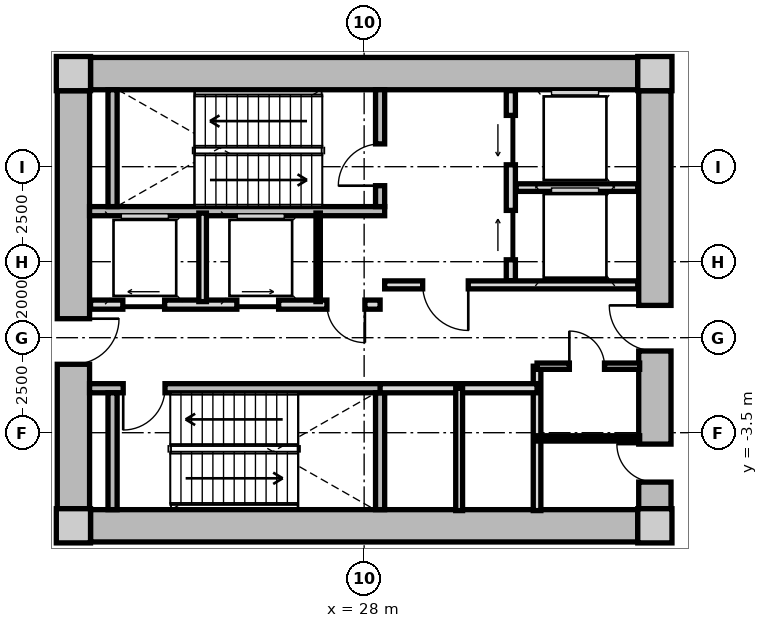
"""IFC4 building model, lengths in metres.
Left out: names, types, materials, properties, quantities, classifications, styles, units other than length and angle.
Written with IfcOpenShell. Run it as: python <this file> out.ifc"""

import sys

from ifc_helpers import new_model, si_unit, direction, frame, frame_2d, origin, origin_2d, place, context, subcontext, project, spatial, rectangle, extrude, source, transform, mapped, element, fill, save


model = new_model("IFC4")
c1 = context("Model", 3, precision=1e-05, world=origin(), true_north=direction((0.0, 1.0)))
c2 = subcontext(c1, "Body", "Model", "MODEL_VIEW")
j1 = project(units=[si_unit("LENGTHUNIT", "METRE"), si_unit("PLANEANGLEUNIT", "RADIAN")], contexts=[c1])
p1 = place(None, origin())
s1 = spatial("IfcSite", under=j1, at=p1, CompositionType="ELEMENT")
p2 = place(p1, origin())
s2 = spatial("IfcBuilding", under=s1, at=p2, CompositionType="ELEMENT")
p3 = place(p2, frame((0.0, 0.0, 16.8)))
s3 = spatial("IfcBuildingStorey", under=s2, at=p3, CompositionType="ELEMENT", Elevation=16.8)
m1 = source(origin(), c2, "Body", "SweptSolid", [
    extrude(rectangle(XDim=0.9, YDim=0.9, at=origin_2d()), origin(), (0.0, 0.0, 1.0), 4.8),
])
for number, where, z_axis, x_axis in (
    (1, (20.35, -5.95, 0.0), (0.0, 0.0, 1.0), (1.0, 0.0, 0.0)),
    (2, (35.65, -5.95, 0.0), (0.0, 0.0, 1.0), (1.0, 0.0, 0.0)),
    (3, (35.65, 5.95, 0.0), (0.0, 0.0, 1.0), (1.0, 0.0, 0.0)),
    (4, (20.35, 5.95, 0.0), (0.0, 0.0, 1.0), (1.0, 0.0, 0.0)),
):
    element("IfcColumn", number, at=place(p3, frame(where, z_axis=z_axis, x_axis=x_axis)), inside=s3, PredefinedType="COLUMN", context=c2, shape_type="MappedRepresentation", body=[
        mapped(m1, transform((0.0, 0.0, 0.0), x_axis=(1.0, 0.0, 0.0), y_axis=(0.0, 1.0, 0.0), z_axis=(0.0, 0.0, 1.0), scale=1.0)),
    ])
m2 = source(origin(), c2, "Body", "SweptSolid", [
    extrude(rectangle(XDim=14.4, YDim=0.85, at=frame_2d((7.2, 0.0))), origin(), (0.0, 0.0, 1.0), 4.38),
])
for number, where, z_axis, x_axis in (
    (5, (20.8, 5.95, 0.0), (0.0, 0.0, 1.0), (1.0, 0.0, 0.0)),
    (6, (35.2, -5.95, 0.0), (0.0, 0.0, 1.0), (-1.0, 0.0, 0.0)),
):
    element("IfcWall", number, at=place(p3, frame(where, z_axis=z_axis, x_axis=x_axis)), inside=s3, PredefinedType="SHEAR", context=c2, shape_type="MappedRepresentation", body=[
        mapped(m2, transform((0.0, 0.0, 0.0), x_axis=(1.0, 0.0, 0.0), y_axis=(0.0, 1.0, 0.0), z_axis=(0.0, 0.0, 1.0), scale=1.0)),
    ])
m3 = source(origin(), c2, "Body", "SweptSolid", [
    extrude(rectangle(XDim=11.0, YDim=0.85, at=frame_2d((5.5, 0.0))), origin(), (0.0, 0.0, 1.0), 4.38),
])
p4 = place(p3, frame((20.35, -5.5, 0.0), z_axis=(0.0, 0.0, 1.0), x_axis=(0.0, 1.0, 0.0)))
e7 = element("IfcWall", 7, at=p4, inside=s3, PredefinedType="SHEAR", context=c2, shape_type="MappedRepresentation", body=[
    mapped(m3, transform((0.0, 0.0, 0.0), x_axis=(1.0, 0.0, 0.0), y_axis=(0.0, 1.0, 0.0), z_axis=(0.0, 0.0, 1.0), scale=1.0)),
])
p5 = place(p4, frame((3.8, 0.0, 0.0)))
e8 = element("IfcOpeningElement", 8, at=p5, cuts=e7, PredefinedType="OPENING", context=c2, shape_type="SweptSolid", body=[
    extrude(rectangle(XDim=1.2, YDim=2.15, at=frame_2d((0.6, 1.075))), frame((0.0, 0.435, 0.0), z_axis=(0.0, -1.0, 0.0), x_axis=(1.0, 0.0, 0.0)), (0.0, 0.0, 1.0), 0.87),
])
p6 = place(p3, frame((35.65, 5.5, 0.0), z_axis=(0.0, 0.0, 1.0), x_axis=(0.0, -1.0, 0.0)))
e9 = element("IfcWall", 9, at=p6, inside=s3, PredefinedType="SHEAR", context=c2, shape_type="MappedRepresentation", body=[
    mapped(m3, transform((0.0, 0.0, 0.0), x_axis=(1.0, 0.0, 0.0), y_axis=(0.0, 1.0, 0.0), z_axis=(0.0, 0.0, 1.0), scale=1.0)),
])
p7 = place(p6, frame((5.65, 0.0, 0.0)))
e10 = element("IfcOpeningElement", 10, at=p7, cuts=e9, PredefinedType="OPENING", context=c2, shape_type="SweptSolid", body=[
    extrude(rectangle(XDim=1.2, YDim=2.15, at=frame_2d((0.6, 1.075))), frame((0.0, 0.435, 0.0), z_axis=(0.0, -1.0, 0.0), x_axis=(1.0, 0.0, 0.0)), (0.0, 0.0, 1.0), 0.87),
])
p8 = place(p6, frame((9.3, 0.0, 0.0)))
e11 = element("IfcOpeningElement", 11, at=p8, cuts=e9, PredefinedType="OPENING", context=c2, shape_type="SweptSolid", body=[
    extrude(rectangle(XDim=1.0, YDim=2.1, at=frame_2d((0.5, 1.05))), frame((0.0, 0.435, 0.0), z_axis=(0.0, -1.0, 0.0), x_axis=(1.0, 0.0, 0.0)), (0.0, 0.0, 1.0), 0.87),
])
m4 = source(origin(), c2, "Body", "SweptSolid", [
    extrude(rectangle(XDim=7.765, YDim=0.24, at=frame_2d((3.883, 0.0))), origin(), (0.0, 0.0, 1.0), 4.38),
])
p9 = place(p3, frame((20.775, 2.33, 0.0), z_axis=(0.0, 0.0, 1.0), x_axis=(1.0, 0.0, 0.0)))
e12 = element("IfcWall", 12, at=p9, inside=s3, PredefinedType="PARTITIONING", context=c2, shape_type="MappedRepresentation", body=[
    mapped(m4, transform((0.0, 0.0, 0.0), x_axis=(1.0, 0.0, 0.0), y_axis=(0.0, 1.0, 0.0), z_axis=(0.0, 0.0, 1.0), scale=1.0)),
])
m5 = source(origin(), c2, "Body", "SweptSolid", [
    extrude(rectangle(XDim=3.075, YDim=0.24, at=frame_2d((1.538, 0.0))), origin(), (0.0, 0.0, 1.0), 4.38),
])
p10 = place(p3, frame((21.38, 2.45, 0.0), z_axis=(0.0, 0.0, 1.0), x_axis=(0.0, 1.0, 0.0)))
e13 = element("IfcWall", 13, at=p10, inside=s3, PredefinedType="PARTITIONING", context=c2, shape_type="MappedRepresentation", body=[
    mapped(m5, transform((0.0, 0.0, 0.0), x_axis=(1.0, 0.0, 0.0), y_axis=(0.0, 1.0, 0.0), z_axis=(0.0, 0.0, 1.0), scale=1.0)),
])
p11 = place(p3, frame((28.42, 2.45, 0.0), z_axis=(0.0, 0.0, 1.0), x_axis=(0.0, 1.0, 0.0)))
e14 = element("IfcWall", 14, at=p11, inside=s3, PredefinedType="PARTITIONING", context=c2, shape_type="MappedRepresentation", body=[
    mapped(m5, transform((0.0, 0.0, 0.0), x_axis=(1.0, 0.0, 0.0), y_axis=(0.0, 1.0, 0.0), z_axis=(0.0, 0.0, 1.0), scale=1.0)),
])
p12 = place(p11, frame((0.55, 0.0, 0.0)))
e15 = element("IfcOpeningElement", 15, at=p12, cuts=e14, PredefinedType="OPENING", context=c2, shape_type="SweptSolid", body=[
    extrude(rectangle(XDim=1.1, YDim=2.15, at=frame_2d((0.55, 1.075))), frame((0.0, 0.13, 0.0), z_axis=(0.0, -1.0, 0.0), x_axis=(1.0, 0.0, 0.0)), (0.0, 0.0, 1.0), 0.26),
])
p13 = place(p3, frame((20.775, -2.33, 0.0), z_axis=(0.0, 0.0, 1.0), x_axis=(1.0, 0.0, 0.0)))
e16 = element("IfcWall", 16, at=p13, inside=s3, PredefinedType="PARTITIONING", context=c2, shape_type="MappedRepresentation", body=[
    mapped(m4, transform((0.0, 0.0, 0.0), x_axis=(1.0, 0.0, 0.0), y_axis=(0.0, 1.0, 0.0), z_axis=(0.0, 0.0, 1.0), scale=1.0)),
])
p14 = place(p13, frame((0.885, 0.0, 0.0)))
e17 = element("IfcOpeningElement", 17, at=p14, cuts=e16, PredefinedType="OPENING", context=c2, shape_type="SweptSolid", body=[
    extrude(rectangle(XDim=1.1, YDim=2.15, at=frame_2d((0.55, 1.075))), frame((0.0, 0.13, 0.0), z_axis=(0.0, -1.0, 0.0), x_axis=(1.0, 0.0, 0.0)), (0.0, 0.0, 1.0), 0.26),
])
for number, where, z_axis, x_axis in (
    (18, (21.38, -5.525, 0.0), (0.0, 0.0, 1.0), (0.0, 1.0, 0.0)),
    (19, (28.42, -5.525, 0.0), (0.0, 0.0, 1.0), (0.0, 1.0, 0.0)),
):
    element("IfcWall", number, at=place(p3, frame(where, z_axis=z_axis, x_axis=x_axis)), inside=s3, PredefinedType="PARTITIONING", context=c2, shape_type="MappedRepresentation", body=[
        mapped(m5, transform((0.0, 0.0, 0.0), x_axis=(1.0, 0.0, 0.0), y_axis=(0.0, 1.0, 0.0), z_axis=(0.0, 0.0, 1.0), scale=1.0)),
    ])
m6 = source(origin(), c2, "Body", "SweptSolid", [
    extrude(rectangle(XDim=5.0, YDim=0.24, at=frame_2d((2.5, 0.0))), origin(), (0.0, 0.0, 1.0), 4.365),
])
p15 = place(p3, frame((31.86, 0.5, 0.0), z_axis=(0.0, 0.0, 1.0), x_axis=(0.0, 1.0, 0.0)))
e20 = element("IfcWall", 20, at=p15, inside=s3, PredefinedType="PARTITIONING", context=c2, shape_type="MappedRepresentation", body=[
    mapped(m6, transform((0.0, 0.0, 0.0), x_axis=(1.0, 0.0, 0.0), y_axis=(0.0, 1.0, 0.0), z_axis=(0.0, 0.0, 1.0), scale=1.0)),
])
p16 = place(p15, frame((3.05, 0.0, 0.0)))
e21 = element("IfcOpeningElement", 21, at=p16, cuts=e20, PredefinedType="OPENING", context=c2, shape_type="SweptSolid", body=[
    extrude(rectangle(XDim=1.3, YDim=2.2, at=frame_2d((0.65, 1.1))), frame((0.0, 0.13, 0.0), z_axis=(0.0, -1.0, 0.0), x_axis=(1.0, 0.0, 0.0)), (0.0, 0.0, 1.0), 0.26),
])
p17 = place(p15, frame((0.55, 0.0, 0.0)))
e22 = element("IfcOpeningElement", 22, at=p17, cuts=e20, PredefinedType="OPENING", context=c2, shape_type="SweptSolid", body=[
    extrude(rectangle(XDim=1.3, YDim=2.2, at=frame_2d((0.65, 1.1))), frame((0.0, 0.13, 0.0), z_axis=(0.0, -1.0, 0.0), x_axis=(1.0, 0.0, 0.0)), (0.0, 0.0, 1.0), 0.26),
])
m7 = source(origin(), c2, "Body", "SweptSolid", [
    extrude(rectangle(XDim=3.2, YDim=0.2, at=frame_2d((1.6, 0.0))), origin(), (0.0, 0.0, 1.0), 4.365),
])
p18 = place(p3, frame((32.0, 2.95, 0.0), z_axis=(0.0, 0.0, 1.0), x_axis=(1.0, 0.0, 0.0)))
e23 = element("IfcWall", 23, at=p18, inside=s3, PredefinedType="PARTITIONING", context=c2, shape_type="MappedRepresentation", body=[
    mapped(m7, transform((0.0, 0.0, 0.0), x_axis=(1.0, 0.0, 0.0), y_axis=(0.0, 1.0, 0.0), z_axis=(0.0, 0.0, 1.0), scale=1.0)),
])
m8 = source(origin(), c2, "Body", "SweptSolid", [
    extrude(rectangle(XDim=6.66, YDim=0.21, at=frame_2d((3.33, 0.0))), origin(), (0.0, 0.0, 1.0), 4.365),
])
p19 = place(p3, frame((28.54, 0.39, 0.0), z_axis=(0.0, 0.0, 1.0), x_axis=(1.0, 0.0, 0.0)))
e24 = element("IfcWall", 24, at=p19, inside=s3, PredefinedType="PARTITIONING", context=c2, shape_type="MappedRepresentation", body=[
    mapped(m8, transform((0.0, 0.0, 0.0), x_axis=(1.0, 0.0, 0.0), y_axis=(0.0, 1.0, 0.0), z_axis=(0.0, 0.0, 1.0), scale=1.0)),
])
p20 = place(p19, frame((1.0, 0.0, 0.0)))
e25 = element("IfcOpeningElement", 25, at=p20, cuts=e24, PredefinedType="OPENING", context=c2, shape_type="SweptSolid", body=[
    extrude(rectangle(XDim=1.2, YDim=2.15, at=frame_2d((0.6, 1.075))), frame((0.0, 0.115, 0.0), z_axis=(0.0, -1.0, 0.0), x_axis=(1.0, 0.0, 0.0)), (0.0, 0.0, 1.0), 0.23),
])
m9 = source(origin(), c2, "Body", "SweptSolid", [
    extrude(rectangle(XDim=7.62, YDim=0.24, at=frame_2d((3.81, 0.0))), origin(), (0.0, 0.0, 1.0), 4.365),
])
p21 = place(p3, frame((20.8, -0.13, 0.0), z_axis=(0.0, 0.0, 1.0), x_axis=(1.0, 0.0, 0.0)))
e26 = element("IfcWall", 26, at=p21, inside=s3, PredefinedType="PARTITIONING", context=c2, shape_type="MappedRepresentation", body=[
    mapped(m9, transform((0.0, 0.0, 0.0), x_axis=(1.0, 0.0, 0.0), y_axis=(0.0, 1.0, 0.0), z_axis=(0.0, 0.0, 1.0), scale=1.0)),
])
p22 = place(p21, frame((6.22, 0.0, 0.0)))
e27 = element("IfcOpeningElement", 27, at=p22, cuts=e26, PredefinedType="OPENING", context=c2, shape_type="SweptSolid", body=[
    extrude(rectangle(XDim=1.0, YDim=2.1, at=frame_2d((0.5, 1.05))), frame((0.0, 0.13, 0.0), z_axis=(0.0, -1.0, 0.0), x_axis=(1.0, 0.0, 0.0)), (0.0, 0.0, 1.0), 0.26),
])
p23 = place(p21, frame((0.85, 0.0, 0.0)))
e28 = element("IfcOpeningElement", 28, at=p23, cuts=e26, PredefinedType="OPENING", context=c2, shape_type="SweptSolid", body=[
    extrude(rectangle(XDim=1.1, YDim=2.2, at=frame_2d((0.55, 1.1))), frame((0.0, 0.13, 0.0), z_axis=(0.0, -1.0, 0.0), x_axis=(1.0, 0.0, 0.0)), (0.0, 0.0, 1.0), 0.26),
])
p24 = place(p21, frame((3.85, 0.0, 0.0)))
e29 = element("IfcOpeningElement", 29, at=p24, cuts=e26, PredefinedType="OPENING", context=c2, shape_type="SweptSolid", body=[
    extrude(rectangle(XDim=1.1, YDim=2.2, at=frame_2d((0.55, 1.1))), frame((0.0, 0.13, 0.0), z_axis=(0.0, -1.0, 0.0), x_axis=(1.0, 0.0, 0.0)), (0.0, 0.0, 1.0), 0.26),
])
m10 = source(origin(), c2, "Body", "SweptSolid", [
    extrude(rectangle(XDim=2.33, YDim=0.115, at=frame_2d((1.165, 0.0))), origin(), (0.0, 0.0, 1.0), 4.365),
])
p25 = place(p3, frame((26.79, -0.05, 0.0), z_axis=(0.0, 0.0, 1.0), x_axis=(0.0, 1.0, 0.0)))
e30 = element("IfcWall", 30, at=p25, inside=s3, PredefinedType="PARTITIONING", context=c2, shape_type="MappedRepresentation", body=[
    mapped(m10, transform((0.0, 0.0, 0.0), x_axis=(1.0, 0.0, 0.0), y_axis=(0.0, 1.0, 0.0), z_axis=(0.0, 0.0, 1.0), scale=1.0)),
])
m11 = source(origin(), c2, "Body", "SweptSolid", [
    extrude(rectangle(XDim=2.33, YDim=0.2, at=frame_2d((1.165, 0.0))), origin(), (0.0, 0.0, 1.0), 4.365),
])
p26 = place(p3, frame((23.75, -0.05, 0.0), z_axis=(0.0, 0.0, 1.0), x_axis=(0.0, 1.0, 0.0)))
e31 = element("IfcWall", 31, at=p26, inside=s3, PredefinedType="PARTITIONING", context=c2, shape_type="MappedRepresentation", body=[
    mapped(m11, transform((0.0, 0.0, 0.0), x_axis=(1.0, 0.0, 0.0), y_axis=(0.0, 1.0, 0.0), z_axis=(0.0, 0.0, 1.0), scale=1.0)),
])
m12 = source(origin(), c2, "Body", "SweptSolid", [
    extrude(rectangle(XDim=3.8, YDim=0.2, at=frame_2d((1.9, 0.0))), origin(), (0.0, 0.0, 1.0), 4.365),
])
p27 = place(p3, frame((32.55, -5.55, 0.0), z_axis=(0.0, 0.0, 1.0), x_axis=(0.0, 1.0, 0.0)))
e32 = element("IfcWall", 32, at=p27, inside=s3, PredefinedType="PARTITIONING", context=c2, shape_type="MappedRepresentation", body=[
    mapped(m12, transform((0.0, 0.0, 0.0), x_axis=(1.0, 0.0, 0.0), y_axis=(0.0, 1.0, 0.0), z_axis=(0.0, 0.0, 1.0), scale=1.0)),
])
m13 = source(origin(), c2, "Body", "SweptSolid", [
    extrude(rectangle(XDim=4.13, YDim=0.24, at=frame_2d((2.065, 0.0))), origin(), (0.0, 0.0, 1.0), 4.365),
])
p28 = place(p3, frame((28.42, -2.33, 0.0), z_axis=(0.0, 0.0, 1.0), x_axis=(1.0, 0.0, 0.0)))
e33 = element("IfcWall", 33, at=p28, inside=s3, PredefinedType="PARTITIONING", context=c2, shape_type="MappedRepresentation", body=[
    mapped(m13, transform((0.0, 0.0, 0.0), x_axis=(1.0, 0.0, 0.0), y_axis=(0.0, 1.0, 0.0), z_axis=(0.0, 0.0, 1.0), scale=1.0)),
])
m14 = source(origin(), c2, "Body", "SweptSolid", [
    extrude(rectangle(XDim=3.22, YDim=0.18, at=frame_2d((1.61, 0.0))), origin(), (0.0, 0.0, 1.0), 4.365),
])
p29 = place(p3, frame((30.5, -5.55, 0.0), z_axis=(0.0, 0.0, 1.0), x_axis=(0.0, 1.0, 0.0)))
e34 = element("IfcWall", 34, at=p29, inside=s3, PredefinedType="PARTITIONING", context=c2, shape_type="MappedRepresentation", body=[
    mapped(m14, transform((0.0, 0.0, 0.0), x_axis=(1.0, 0.0, 0.0), y_axis=(0.0, 1.0, 0.0), z_axis=(0.0, 0.0, 1.0), scale=1.0)),
])
m15 = source(origin(), c2, "Body", "SweptSolid", [
    extrude(rectangle(XDim=2.7, YDim=0.165, at=frame_2d((1.35, 0.0))), origin(), (0.0, 0.0, 1.0), 4.365),
])
p30 = place(p3, frame((32.55, -1.75, 0.0), z_axis=(0.0, 0.0, 1.0), x_axis=(1.0, 0.0, 0.0)))
e35 = element("IfcWall", 35, at=p30, inside=s3, PredefinedType="PARTITIONING", context=c2, shape_type="MappedRepresentation", body=[
    mapped(m15, transform((0.0, 0.0, 0.0), x_axis=(1.0, 0.0, 0.0), y_axis=(0.0, 1.0, 0.0), z_axis=(0.0, 0.0, 1.0), scale=1.0)),
])
p31 = place(p30, frame((0.85, 0.0, 0.0)))
e36 = element("IfcOpeningElement", 36, at=p31, cuts=e35, PredefinedType="OPENING", context=c2, shape_type="SweptSolid", body=[
    extrude(rectangle(XDim=0.925, YDim=2.1, at=frame_2d((0.462, 1.05))), frame((0.0, 0.093, 0.0), z_axis=(0.0, -1.0, 0.0), x_axis=(1.0, 0.0, 0.0)), (0.0, 0.0, 1.0), 0.185),
])
m16 = source(origin(), c2, "Body", "SweptSolid", [
    extrude(rectangle(XDim=2.7, YDim=0.14, at=frame_2d((1.35, 0.0))), origin(), (0.0, 0.0, 1.0), 4.365),
])
p32 = place(p3, frame((32.55, -3.65, 0.0), z_axis=(0.0, 0.0, 1.0), x_axis=(1.0, 0.0, 0.0)))
e37 = element("IfcWall", 37, at=p32, inside=s3, PredefinedType="PARTITIONING", context=c2, shape_type="MappedRepresentation", body=[
    mapped(m16, transform((0.0, 0.0, 0.0), x_axis=(1.0, 0.0, 0.0), y_axis=(0.0, 1.0, 0.0), z_axis=(0.0, 0.0, 1.0), scale=1.0)),
])
m17 = source(origin(), c2, "Body", "SweptSolid", [
    extrude(rectangle(XDim=1.1, YDim=2.15, at=frame_2d((0.55, 1.075))), frame((0.0, 0.025, 0.0), z_axis=(0.0, -1.0, 0.0), x_axis=(1.0, 0.0, 0.0)), (0.0, 0.0, 1.0), 0.05),
])
p33 = place(p12, origin())
e38 = element("IfcDoor", 38, at=p33, inside=s3, OperationType="SINGLE_SWING_LEFT", PredefinedType="DOOR", context=c2, shape_type="MappedRepresentation", body=[
    mapped(m17, transform((0.0, 0.0, 0.0), x_axis=(1.0, 0.0, 0.0), y_axis=(0.0, 1.0, 0.0), z_axis=(0.0, 0.0, 1.0), scale=1.0)),
])
fill(e15, e38)
p34 = place(p14, frame((1.1, 0.0, 0.0), z_axis=(0.0, 0.0, 1.0), x_axis=(-1.0, 0.0, 0.0)))
e39 = element("IfcDoor", 39, at=p34, inside=s3, OperationType="SINGLE_SWING_RIGHT", PredefinedType="DOOR", context=c2, shape_type="MappedRepresentation", body=[
    mapped(m17, transform((0.0, 0.0, 0.0), x_axis=(1.0, 0.0, 0.0), y_axis=(0.0, 1.0, 0.0), z_axis=(0.0, 0.0, 1.0), scale=1.0)),
])
fill(e17, e39)
m18 = source(origin(), c2, "Body", "SweptSolid", [
    extrude(rectangle(XDim=1.3, YDim=2.2, at=frame_2d((0.65, 1.1))), frame((0.0, 0.025, 0.0), z_axis=(0.0, -1.0, 0.0), x_axis=(1.0, 0.0, 0.0)), (0.0, 0.0, 1.0), 0.05),
])
p35 = place(p16, origin())
e40 = element("IfcDoor", 40, at=p35, inside=s3, OperationType="SLIDING_TO_LEFT", PredefinedType="DOOR", context=c2, shape_type="MappedRepresentation", body=[
    mapped(m18, transform((0.0, 0.0, 0.0), x_axis=(1.0, 0.0, 0.0), y_axis=(0.0, 1.0, 0.0), z_axis=(0.0, 0.0, 1.0), scale=1.0)),
])
fill(e21, e40)
p36 = place(p17, origin())
e41 = element("IfcDoor", 41, at=p36, inside=s3, OperationType="SLIDING_TO_RIGHT", PredefinedType="DOOR", context=c2, shape_type="MappedRepresentation", body=[
    mapped(m18, transform((0.0, 0.0, 0.0), x_axis=(1.0, 0.0, 0.0), y_axis=(0.0, 1.0, 0.0), z_axis=(0.0, 0.0, 1.0), scale=1.0)),
])
fill(e22, e41)
m19 = source(origin(), c2, "Body", "SweptSolid", [
    extrude(rectangle(XDim=1.2, YDim=2.15, at=frame_2d((0.6, 1.075))), frame((0.0, 0.025, 0.0), z_axis=(0.0, -1.0, 0.0), x_axis=(1.0, 0.0, 0.0)), (0.0, 0.0, 1.0), 0.05),
])
p37 = place(p20, frame((1.2, 0.0, 0.0), z_axis=(0.0, 0.0, 1.0), x_axis=(-1.0, 0.0, 0.0)))
e42 = element("IfcDoor", 42, at=p37, inside=s3, OperationType="SINGLE_SWING_LEFT", PredefinedType="DOOR", context=c2, shape_type="MappedRepresentation", body=[
    mapped(m19, transform((0.0, 0.0, 0.0), x_axis=(1.0, 0.0, 0.0), y_axis=(0.0, 1.0, 0.0), z_axis=(0.0, 0.0, 1.0), scale=1.0)),
])
fill(e25, e42)
p38 = place(p5, frame((1.2, 0.0, 0.0), z_axis=(0.0, 0.0, 1.0), x_axis=(-1.0, 0.0, 0.0)))
e43 = element("IfcDoor", 43, at=p38, inside=s3, OperationType="SINGLE_SWING_LEFT", PredefinedType="DOOR", context=c2, shape_type="MappedRepresentation", body=[
    mapped(m19, transform((0.0, 0.0, 0.0), x_axis=(1.0, 0.0, 0.0), y_axis=(0.0, 1.0, 0.0), z_axis=(0.0, 0.0, 1.0), scale=1.0)),
])
fill(e8, e43)
p39 = place(p7, frame((1.2, 0.0, 0.0), z_axis=(0.0, 0.0, 1.0), x_axis=(-1.0, 0.0, 0.0)))
e44 = element("IfcDoor", 44, at=p39, inside=s3, OperationType="SINGLE_SWING_RIGHT", PredefinedType="DOOR", context=c2, shape_type="MappedRepresentation", body=[
    mapped(m19, transform((0.0, 0.0, 0.0), x_axis=(1.0, 0.0, 0.0), y_axis=(0.0, 1.0, 0.0), z_axis=(0.0, 0.0, 1.0), scale=1.0)),
])
fill(e10, e44)
m20 = source(origin(), c2, "Body", "SweptSolid", [
    extrude(rectangle(XDim=1.0, YDim=2.1, at=frame_2d((0.5, 1.05))), frame((0.0, 0.025, 0.0), z_axis=(0.0, -1.0, 0.0), x_axis=(1.0, 0.0, 0.0)), (0.0, 0.0, 1.0), 0.05),
])
p40 = place(p22, frame((1.0, 0.0, 0.0), z_axis=(0.0, 0.0, 1.0), x_axis=(-1.0, 0.0, 0.0)))
e45 = element("IfcDoor", 45, at=p40, inside=s3, OperationType="SINGLE_SWING_LEFT", PredefinedType="DOOR", context=c2, shape_type="MappedRepresentation", body=[
    mapped(m20, transform((0.0, 0.0, 0.0), x_axis=(1.0, 0.0, 0.0), y_axis=(0.0, 1.0, 0.0), z_axis=(0.0, 0.0, 1.0), scale=1.0)),
])
fill(e27, e45)
m21 = source(origin(), c2, "Body", "SweptSolid", [
    extrude(rectangle(XDim=1.1, YDim=2.2, at=frame_2d((0.55, 1.1))), frame((0.0, 0.025, 0.0), z_axis=(0.0, -1.0, 0.0), x_axis=(1.0, 0.0, 0.0)), (0.0, 0.0, 1.0), 0.05),
])
p41 = place(p23, origin())
e46 = element("IfcDoor", 46, at=p41, inside=s3, OperationType="SLIDING_TO_LEFT", PredefinedType="DOOR", context=c2, shape_type="MappedRepresentation", body=[
    mapped(m21, transform((0.0, 0.0, 0.0), x_axis=(1.0, 0.0, 0.0), y_axis=(0.0, 1.0, 0.0), z_axis=(0.0, 0.0, 1.0), scale=1.0)),
])
fill(e28, e46)
p42 = place(p24, origin())
e47 = element("IfcDoor", 47, at=p42, inside=s3, OperationType="SLIDING_TO_RIGHT", PredefinedType="DOOR", context=c2, shape_type="MappedRepresentation", body=[
    mapped(m21, transform((0.0, 0.0, 0.0), x_axis=(1.0, 0.0, 0.0), y_axis=(0.0, 1.0, 0.0), z_axis=(0.0, 0.0, 1.0), scale=1.0)),
])
fill(e29, e47)
m22 = source(origin(), c2, "Body", "SweptSolid", [
    extrude(rectangle(XDim=0.925, YDim=2.1, at=frame_2d((0.462, 1.05))), frame((0.0, 0.025, 0.0), z_axis=(0.0, -1.0, 0.0), x_axis=(1.0, 0.0, 0.0)), (0.0, 0.0, 1.0), 0.05),
])
p43 = place(p31, origin())
e48 = element("IfcDoor", 48, at=p43, inside=s3, OperationType="SINGLE_SWING_LEFT", PredefinedType="DOOR", context=c2, shape_type="MappedRepresentation", body=[
    mapped(m22, transform((0.0, 0.0, 0.0), x_axis=(1.0, 0.0, 0.0), y_axis=(0.0, 1.0, 0.0), z_axis=(0.0, 0.0, 1.0), scale=1.0)),
])
fill(e36, e48)
p44 = place(p8, frame((1.0, 0.0, 0.0), z_axis=(0.0, 0.0, 1.0), x_axis=(-1.0, 0.0, 0.0)))
e49 = element("IfcDoor", 49, at=p44, inside=s3, OperationType="SINGLE_SWING_RIGHT", PredefinedType="DOOR", context=c2, shape_type="MappedRepresentation", body=[
    mapped(m20, transform((0.0, 0.0, 0.0), x_axis=(1.0, 0.0, 0.0), y_axis=(0.0, 1.0, 0.0), z_axis=(0.0, 0.0, 1.0), scale=1.0)),
])
fill(e11, e49)
save(model, sys.argv[1])
